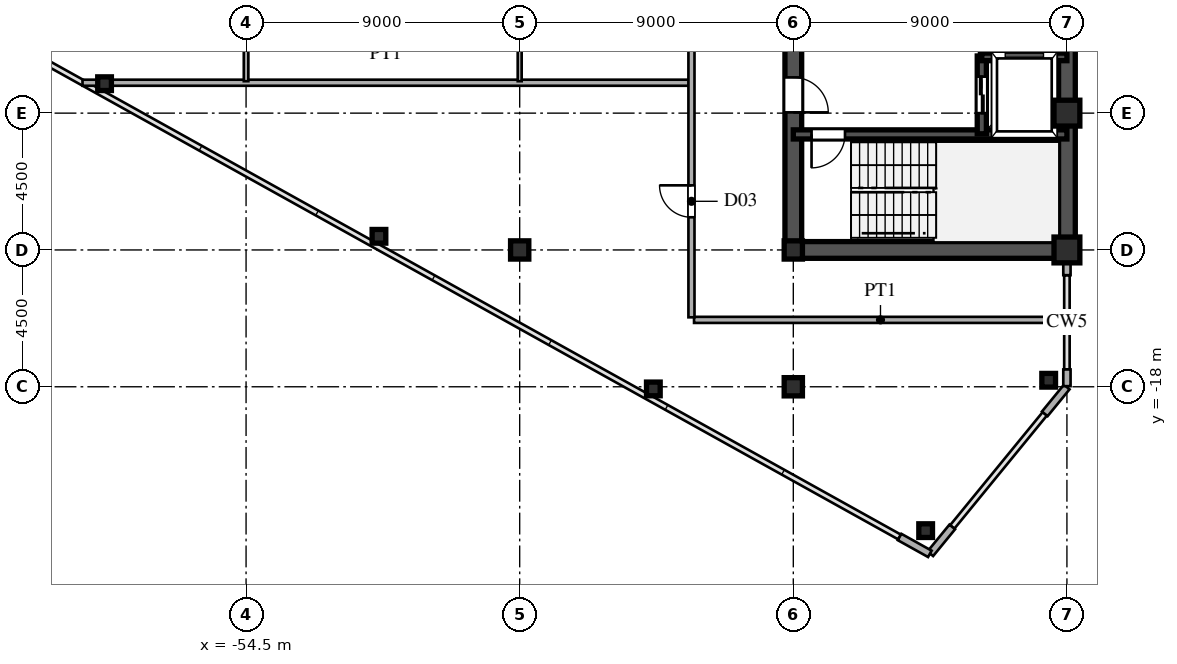
"""IFC4 building model, lengths in metres.
Left out: names, types, materials, properties, quantities, classifications, styles, units other than length and angle.
Written with IfcOpenShell. Run it as: python <this file> out.ifc"""

import sys

from ifc_helpers import new_model, si_unit, direction, frame, frame_2d, origin, origin_2d, place, context, subcontext, project, spatial, rectangle, hollow_rectangle, i_section, extrude, source, transform, mapped, element, fill, save


model = new_model("IFC4")
c1 = context("Model", 3, precision=1e-05, world=origin(), true_north=direction((0.0, 1.0)))
c2 = subcontext(c1, "Body", "Model", "MODEL_VIEW")
j1 = project(units=[si_unit("LENGTHUNIT", "METRE"), si_unit("PLANEANGLEUNIT", "RADIAN")], contexts=[c1])
p1 = place(None, origin())
s1 = spatial("IfcSite", under=j1, at=p1, CompositionType="ELEMENT")
p2 = place(p1, origin())
s2 = spatial("IfcBuilding", under=s1, at=p2, CompositionType="ELEMENT")
p3 = place(p2, frame((0.0, 0.0, 174.3)))
s3 = spatial("IfcBuildingStorey", under=s2, at=p3, CompositionType="ELEMENT", Elevation=174.3)
m1 = source(origin(), c2, "Body", "SweptSolid", [
    extrude(hollow_rectangle(XDim=0.85, YDim=0.85, WallThickness=0.036, at=origin_2d()), origin(), (0.0, 0.0, 1.0), 3.6),
])
for number, where, z_axis, x_axis in (
    (1, (-27.5, -13.5, 0.0), (0.0, 0.0, 1.0), (1.0, 0.0, 0.0)),
    (2, (-27.5, -9.0, 0.0), (0.0, 0.0, 1.0), (1.0, 0.0, 0.0)),
):
    element("IfcColumn", number, at=place(p3, frame(where, z_axis=z_axis, x_axis=x_axis)), inside=s3, PredefinedType="COLUMN", context=c2, shape_type="MappedRepresentation", body=[
        mapped(m1, transform((0.0, 0.0, 0.0), scale=1.0)),
    ])
m2 = source(origin(), c2, "Body", "SweptSolid", [
    extrude(i_section(OverallWidth=0.6, OverallDepth=0.6, WebThickness=0.025, FlangeThickness=0.04, at=origin_2d()), origin(), (0.0, 0.0, 1.0), 3.6),
])
for number, where, z_axis, x_axis in (
    (3, (-36.5, -18.0, 0.0), (0.0, 0.0, 1.0), (1.0, 0.0, 0.0)),
    (4, (-36.5, -13.5, 0.0), (0.0, 0.0, 1.0), (1.0, 0.0, 0.0)),
    (5, (-45.5, -13.5, 0.0), (0.0, 0.0, 1.0), (1.0, 0.0, 0.0)),
):
    element("IfcColumn", number, at=place(p3, frame(where, z_axis=z_axis, x_axis=x_axis)), inside=s3, PredefinedType="COLUMN", context=c2, shape_type="MappedRepresentation", body=[
        mapped(m2, transform((0.0, 0.0, 0.0), scale=1.0)),
    ])
m3 = source(origin(), c2, "Body", "SweptSolid", [
    extrude(hollow_rectangle(XDim=0.45, YDim=0.45, WallThickness=0.018, at=origin_2d()), origin(), (0.0, 0.0, 1.0), 3.6),
])
for number, where, z_axis, x_axis in (
    (6, (-28.1, -17.786, 0.0), (0.0, 0.0, 1.0), (1.0, 0.0, 0.0)),
    (7, (-32.147, -22.732, 0.0), (0.0, 0.0, 1.0), (1.0, 0.0, 0.0)),
    (8, (-41.104, -18.071, 0.0), (0.0, 0.0, 1.0), (1.0, 0.0, 0.0)),
    (9, (-50.129, -13.051, 0.0), (0.0, 0.0, 1.0), (1.0, 0.0, 0.0)),
    (10, (-59.155, -8.031, 0.0), (0.0, 0.0, 1.0), (1.0, 0.0, 0.0)),
):
    element("IfcColumn", number, at=place(p3, frame(where, z_axis=z_axis, x_axis=x_axis)), inside=s3, PredefinedType="COLUMN", context=c2, shape_type="MappedRepresentation", body=[
        mapped(m3, transform((0.0, 0.0, 0.0), scale=1.0)),
    ])
p4 = place(p3, frame((-27.5, -17.98, 0.0), z_axis=(0.0, 0.0, 1.0), x_axis=(0.0, 1.0, 0.0)))
e11 = element("IfcWall", 11, at=p4, inside=s3, PredefinedType="SOLIDWALL", context=c2, shape_type="SweptSolid", body=[
    extrude(rectangle(XDim=0.55, YDim=0.24, at=frame_2d((0.275, 0.0))), origin(), (0.0, 0.0, 1.0), 3.38),
])
p5 = place(p3, frame((-27.5, -14.33, 0.0), z_axis=(0.0, 0.0, 1.0), x_axis=(0.0, 1.0, 0.0)))
e12 = element("IfcWall", 12, at=p5, inside=s3, PredefinedType="SOLIDWALL", context=c2, shape_type="SweptSolid", body=[
    extrude(rectangle(XDim=0.55, YDim=0.24, at=frame_2d((0.275, 0.0))), origin(), (0.0, 0.0, 1.0), 2.88),
])
p6 = place(p3, frame((-33.005, -22.941, 0.0), z_axis=(0.0, 0.0, 1.0), x_axis=(0.87385402111, -0.486188389196, 0.0)))
e13 = element("IfcWall", 13, at=p6, inside=s3, PredefinedType="SOLIDWALL", context=c2, shape_type="SweptSolid", body=[
    extrude(rectangle(XDim=1.14, YDim=0.24, at=frame_2d((0.57, 0.0))), origin(), (0.0, 0.0, 1.0), 3.38),
])
for number, where, z_axis, x_axis in (
    (14, (-31.994, -23.492, 0.0), (0.0, 0.0, 1.0), (0.633, 0.774, 0.0)),
    (15, (-28.228, -18.89, 0.0), (0.0, 0.0, 1.0), (0.633, 0.774, 0.0)),
):
    element("IfcWall", number, at=place(p3, frame(where, z_axis=z_axis, x_axis=x_axis)), inside=s3, PredefinedType="SOLIDWALL", context=c2, shape_type="SweptSolid", body=[
        extrude(rectangle(XDim=1.14, YDim=0.24, at=frame_2d((0.57, 0.0))), origin(), (0.0, 0.0, 1.0), 3.38),
    ])
p7 = place(p3, frame((-27.5, -13.5, 0.0), z_axis=(0.0, 0.0, 1.0), x_axis=(0.0, 1.0, 0.0)))
e16 = element("IfcWall", 16, at=p7, inside=s3, PredefinedType="SHEAR", context=c2, shape_type="SweptSolid", body=[
    extrude(rectangle(XDim=12.2, YDim=0.55, at=frame_2d((6.1, 0.0))), origin(), (0.0, 0.0, 1.0), 3.38),
])
p8 = place(p3, frame((-36.5, -13.5, 0.0), z_axis=(0.0, 0.0, 1.0), x_axis=(1.0, 0.0, 0.0)))
e17 = element("IfcWall", 17, at=p8, inside=s3, PredefinedType="SHEAR", context=c2, shape_type="SweptSolid", body=[
    extrude(rectangle(XDim=9.0, YDim=0.55, at=frame_2d((4.5, 0.0))), origin(), (0.0, 0.0, 1.0), 3.38),
])
p9 = place(p3, frame((-36.5, -13.65, 0.0), z_axis=(0.0, 0.0, 1.0), x_axis=(0.0, 1.0, 0.0)))
e18 = element("IfcWall", 18, at=p9, inside=s3, PredefinedType="SHEAR", context=c2, shape_type="SweptSolid", body=[
    extrude(rectangle(XDim=7.15, YDim=0.55, at=frame_2d((3.575, 0.0))), origin(), (0.0, 0.0, 1.0), 3.38),
])
p10 = place(p9, frame((4.675, 0.0, 0.0)))
e19 = element("IfcOpeningElement", 19, at=p10, cuts=e18, PredefinedType="OPENING", context=c2, shape_type="SweptSolid", body=[
    extrude(rectangle(XDim=1.15, YDim=2.2, at=frame_2d((0.575, 1.1))), frame((0.0, 0.285, 0.0), z_axis=(0.0, -1.0, 0.0), x_axis=(1.0, 0.0, 0.0)), (0.0, 0.0, 1.0), 0.57),
])
p11 = place(p3, frame((-36.5, -9.7, 0.0), z_axis=(0.0, 0.0, 1.0), x_axis=(1.0, 0.0, 0.0)))
e20 = element("IfcWall", 20, at=p11, inside=s3, PredefinedType="SHEAR", context=c2, shape_type="SweptSolid", body=[
    extrude(rectangle(XDim=9.0, YDim=0.3, at=frame_2d((4.5, 0.0))), origin(), (0.0, 0.0, 1.0), 3.38),
])
p12 = place(p11, frame((0.6, 0.0, 0.0)))
e21 = element("IfcOpeningElement", 21, at=p12, cuts=e20, PredefinedType="OPENING", context=c2, shape_type="SweptSolid", body=[
    extrude(rectangle(XDim=1.1, YDim=2.2, at=frame_2d((0.55, 1.1))), frame((0.0, 0.16, 0.0), z_axis=(0.0, -1.0, 0.0), x_axis=(1.0, 0.0, 0.0)), (0.0, 0.0, 1.0), 0.32),
])
p13 = place(p3, frame((-30.3, -7.15, 0.0), z_axis=(0.0, 0.0, 1.0), x_axis=(1.0, 0.0, 0.0)))
e22 = element("IfcWall", 22, at=p13, inside=s3, PredefinedType="SHEAR", context=c2, shape_type="SweptSolid", body=[
    extrude(rectangle(XDim=2.8, YDim=0.25, at=frame_2d((1.4, 0.0))), origin(), (0.0, 0.0, 1.0), 3.38),
])
p14 = place(p3, frame((-30.3, -9.68, 0.0), z_axis=(0.0, 0.0, 1.0), x_axis=(0.0, 1.0, 0.0)))
e23 = element("IfcWall", 23, at=p14, inside=s3, PredefinedType="SHEAR", context=c2, shape_type="SweptSolid", body=[
    extrude(rectangle(XDim=2.56, YDim=0.3, at=frame_2d((1.28, 0.0))), origin(), (0.0, 0.0, 1.0), 3.38),
])
p15 = place(p14, frame((0.68, 0.0, 0.0)))
e24 = element("IfcOpeningElement", 24, at=p15, cuts=e23, PredefinedType="OPENING", context=c2, shape_type="SweptSolid", body=[
    extrude(rectangle(XDim=1.2, YDim=2.25, at=frame_2d((0.6, 1.125))), frame((0.0, 0.16, 0.0), z_axis=(0.0, -1.0, 0.0), x_axis=(1.0, 0.0, 0.0)), (0.0, 0.0, 1.0), 0.32),
])
p16 = place(p3, frame((-30.3, -7.12, 0.0), z_axis=(0.0, 0.0, 1.0), x_axis=(0.0, 1.0, 0.0)))
e25 = element("IfcWall", 25, at=p16, inside=s3, PredefinedType="PARTITIONING", context=c2, shape_type="SweptSolid", body=[
    extrude(rectangle(XDim=0.62, YDim=0.18, at=frame_2d((0.31, 0.0))), origin(), (0.0, 0.0, 1.0), 3.38),
])
p17 = place(p3, frame((-39.765, -15.8, 0.0), z_axis=(0.0, 0.0, 1.0), x_axis=(1.0, 0.0, 0.0)))
e26 = element("IfcWall", 26, at=p17, inside=s3, PredefinedType="PARTITIONING", context=c2, shape_type="SweptSolid", body=[
    extrude(rectangle(XDim=12.265, YDim=0.2, at=frame_2d((6.132, 0.0))), origin(), (0.0, 0.0, 1.0), 3.38),
])
p18 = place(p3, frame((-59.88, -8.0, 0.0), z_axis=(0.0, 0.0, 1.0), x_axis=(1.0, 0.0, 0.0)))
e27 = element("IfcWall", 27, at=p18, inside=s3, PredefinedType="PARTITIONING", context=c2, shape_type="SweptSolid", body=[
    extrude(rectangle(XDim=19.95, YDim=0.2, at=frame_2d((9.975, 0.0))), origin(), (0.0, 0.0, 1.0), 3.38),
])
p19 = place(p3, frame((-54.5, -7.95, 0.0), z_axis=(0.0, 0.0, 1.0), x_axis=(0.0, 1.0, 0.0)))
e28 = element("IfcWall", 28, at=p19, inside=s3, PredefinedType="PARTITIONING", context=c2, shape_type="SweptSolid", body=[
    extrude(rectangle(XDim=13.9, YDim=0.15, at=frame_2d((6.95, 0.0))), origin(), (0.0, 0.0, 1.0), 2.78),
])
p20 = place(p19, frame((6.475, 0.0, 0.0)))
e29 = element("IfcOpeningElement", 29, at=p20, cuts=e28, PredefinedType="OPENING", context=c2, shape_type="SweptSolid", body=[
    extrude(rectangle(XDim=0.95, YDim=2.15, at=frame_2d((0.475, 1.075))), frame((0.0, 0.085, 0.0), z_axis=(0.0, -1.0, 0.0), x_axis=(1.0, 0.0, 0.0)), (0.0, 0.0, 1.0), 0.17),
])
p21 = place(p3, frame((-45.5, -7.95, 0.0), z_axis=(0.0, 0.0, 1.0), x_axis=(0.0, 1.0, 0.0)))
e30 = element("IfcWall", 30, at=p21, inside=s3, PredefinedType="PARTITIONING", context=c2, shape_type="SweptSolid", body=[
    extrude(rectangle(XDim=9.233, YDim=0.13, at=frame_2d((4.616, 0.0))), origin(), (0.0, 0.0, 1.0), 2.78),
])
p22 = place(p21, frame((6.475, 0.0, 0.0)))
e31 = element("IfcOpeningElement", 31, at=p22, cuts=e30, PredefinedType="OPENING", context=c2, shape_type="SweptSolid", body=[
    extrude(rectangle(XDim=0.95, YDim=2.15, at=frame_2d((0.475, 1.075))), frame((0.0, 0.075, 0.0), z_axis=(0.0, -1.0, 0.0), x_axis=(1.0, 0.0, 0.0)), (0.0, 0.0, 1.0), 0.15),
])
p23 = place(p3, frame((-39.85, -15.715, 0.0), z_axis=(0.0, 0.0, 1.0), x_axis=(0.0, 1.0, 0.0)))
e32 = element("IfcWall", 32, at=p23, inside=s3, PredefinedType="PARTITIONING", context=c2, shape_type="SweptSolid", body=[
    extrude(rectangle(XDim=31.43, YDim=0.2, at=frame_2d((15.715, 0.0))), origin(), (0.0, 0.0, 1.0), 3.38),
])
p24 = place(p23, frame((3.29, 0.0, 0.0)))
e33 = element("IfcOpeningElement", 33, at=p24, cuts=e32, PredefinedType="OPENING", context=c2, shape_type="SweptSolid", body=[
    extrude(rectangle(XDim=1.05, YDim=2.25, at=frame_2d((0.525, 1.125))), frame((0.0, 0.11, 0.0), z_axis=(0.0, -1.0, 0.0), x_axis=(1.0, 0.0, 0.0)), (0.0, 0.0, 1.0), 0.22),
])
p25 = place(p23, frame((13.98, 0.0, 0.0)))
e34 = element("IfcOpeningElement", 34, at=p25, cuts=e32, PredefinedType="OPENING", context=c2, shape_type="SweptSolid", body=[
    extrude(rectangle(XDim=1.05, YDim=2.25, at=frame_2d((0.525, 1.125))), frame((0.0, 0.11, 0.0), z_axis=(0.0, -1.0, 0.0), x_axis=(1.0, 0.0, 0.0)), (0.0, 0.0, 1.0), 0.22),
])
p26 = place(p23, frame((26.09, 0.0, 0.0)))
e35 = element("IfcOpeningElement", 35, at=p26, cuts=e32, PredefinedType="OPENING", context=c2, shape_type="SweptSolid", body=[
    extrude(rectangle(XDim=1.05, YDim=2.25, at=frame_2d((0.525, 1.125))), frame((0.0, 0.11, 0.0), z_axis=(0.0, -1.0, 0.0), x_axis=(1.0, 0.0, 0.0)), (0.0, 0.0, 1.0), 0.22),
])
m4 = source(origin(), c2, "Body", "SweptSolid", [
    extrude(rectangle(XDim=1.15, YDim=2.2, at=frame_2d((0.575, 1.1))), frame((0.0, 0.025, 0.0), z_axis=(0.0, -1.0, 0.0), x_axis=(1.0, 0.0, 0.0)), (0.0, 0.0, 1.0), 0.05),
])
p27 = place(p10, frame((1.15, 0.0, 0.0), z_axis=(0.0, 0.0, 1.0), x_axis=(-1.0, 0.0, 0.0)))
e36 = element("IfcDoor", 36, at=p27, inside=s3, OperationType="SINGLE_SWING_LEFT", PredefinedType="DOOR", context=c2, shape_type="MappedRepresentation", body=[
    mapped(m4, transform((0.0, 0.0, 0.0), scale=1.0)),
])
fill(e19, e36)
m5 = source(origin(), c2, "Body", "SweptSolid", [
    extrude(rectangle(XDim=1.1, YDim=2.2, at=frame_2d((0.55, 1.1))), frame((0.0, 0.025, 0.0), z_axis=(0.0, -1.0, 0.0), x_axis=(1.0, 0.0, 0.0)), (0.0, 0.0, 1.0), 0.05),
])
p28 = place(p12, frame((1.1, 0.0, 0.0), z_axis=(0.0, 0.0, 1.0), x_axis=(-1.0, 0.0, 0.0)))
e37 = element("IfcDoor", 37, at=p28, inside=s3, OperationType="SINGLE_SWING_LEFT", PredefinedType="DOOR", context=c2, shape_type="MappedRepresentation", body=[
    mapped(m5, transform((0.0, 0.0, 0.0), scale=1.0)),
])
fill(e21, e37)
m6 = source(origin(), c2, "Body", "SweptSolid", [
    extrude(rectangle(XDim=1.2, YDim=2.25, at=frame_2d((0.6, 1.125))), frame((0.0, 0.025, 0.0), z_axis=(0.0, -1.0, 0.0), x_axis=(1.0, 0.0, 0.0)), (0.0, 0.0, 1.0), 0.05),
])
p29 = place(p15, origin())
e38 = element("IfcDoor", 38, at=p29, inside=s3, OperationType="DOUBLE_DOOR_SLIDING", PredefinedType="DOOR", context=c2, shape_type="MappedRepresentation", body=[
    mapped(m6, transform((0.0, 0.0, 0.0), scale=1.0)),
])
fill(e24, e38)
m7 = source(origin(), c2, "Body", "SweptSolid", [
    extrude(rectangle(XDim=1.05, YDim=2.25, at=frame_2d((0.525, 1.125))), frame((0.0, 0.025, 0.0), z_axis=(0.0, -1.0, 0.0), x_axis=(1.0, 0.0, 0.0)), (0.0, 0.0, 1.0), 0.05),
])
p30 = place(p24, origin())
e39 = element("IfcDoor", 39, at=p30, inside=s3, OperationType="SINGLE_SWING_RIGHT", PredefinedType="DOOR", context=c2, shape_type="MappedRepresentation", body=[
    mapped(m7, transform((0.0, 0.0, 0.0), scale=1.0)),
])
fill(e33, e39)
save(model, sys.argv[1])
